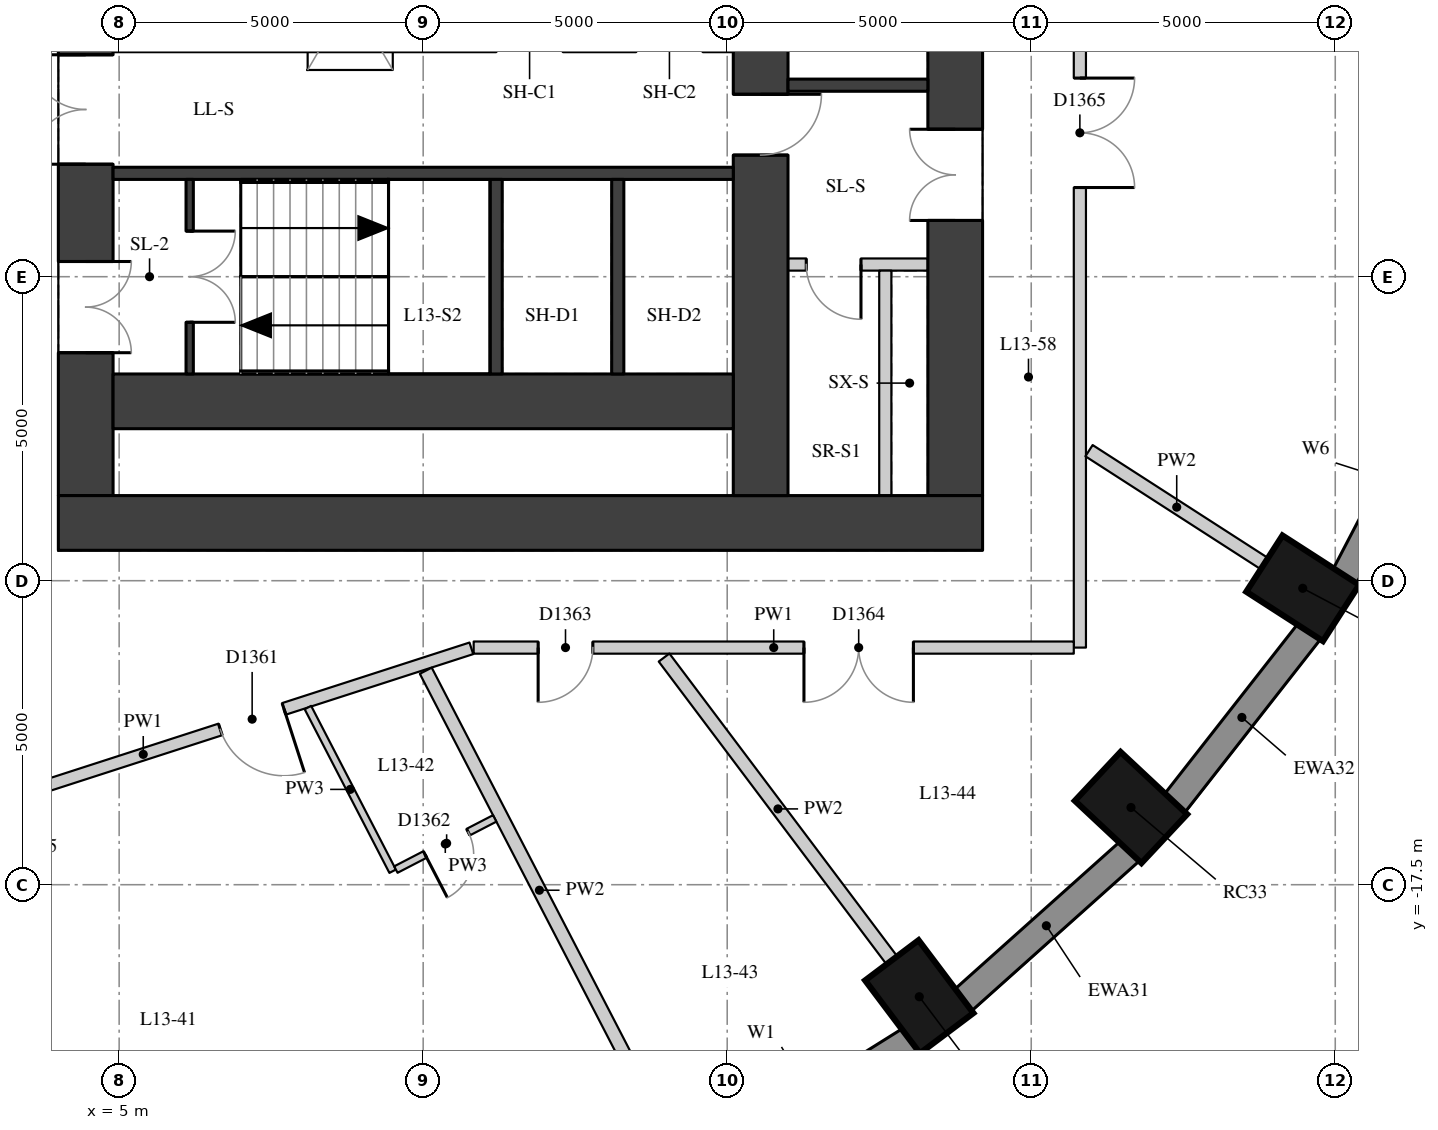
"""IFC4 building model, lengths in metres.
Left out: names, types, materials, properties, quantities, classifications, styles, units other than length and angle.
Written with IfcOpenShell. Run it as: python <this file> out.ifc"""

import sys

from ifc_helpers import new_model, si_unit, direction, frame, frame_2d, origin, origin_2d, place, context, subcontext, project, spatial, rectangle, extrude, element, fill, save


model = new_model("IFC4")
c1 = context("Model", 3, precision=1e-05, world=origin(), true_north=direction((0.0, 1.0)))
c2 = subcontext(c1, "Body", "Model", "MODEL_VIEW")
j1 = project(units=[si_unit("LENGTHUNIT", "METRE"), si_unit("PLANEANGLEUNIT", "RADIAN")], contexts=[c1])
p1 = place(None, origin())
s1 = spatial("IfcSite", under=j1, at=p1, CompositionType="ELEMENT")
p2 = place(p1, origin())
s2 = spatial("IfcBuilding", under=s1, at=p2, CompositionType="ELEMENT")
p3 = place(p2, frame((0.0, 0.0, 51.4)))
s3 = spatial("IfcBuildingStorey", under=s2, at=p3, CompositionType="ELEMENT", Elevation=51.4)
for number, where, z_axis, x_axis in (
    (1, (18.159, -19.343, 0.0), (0.0, 0.0, 1.0), (0.601, -0.799, 0.0)),
    (2, (21.641, -16.23, 0.0), (0.0, 0.0, 1.0), (0.73, -0.683, 0.0)),
    (3, (24.465, -12.625, 0.0), (0.0, 0.0, 1.0), (0.841, -0.541, 0.0)),
):
    element("IfcColumn", number, at=place(p3, frame(where, z_axis=z_axis, x_axis=x_axis)), inside=s3, PredefinedType="COLUMN", context=c2, shape_type="SweptSolid", body=[
        extrude(rectangle(XDim=1.5, YDim=1.1, at=origin_2d()), origin(), (0.0, 0.0, 1.0), 3.3),
    ])
p4 = place(p3, frame((14.817, -22.051, 0.0), z_axis=(0.0, 0.0, 1.0), x_axis=(0.847635480093, 0.530579016629, 0.0)))
e4 = element("IfcWall", 4, at=p4, inside=s3, PredefinedType="SOLIDWALL", context=c2, shape_type="SweptSolid", body=[
    extrude(rectangle(XDim=3.782, YDim=0.45, at=frame_2d((1.891, 0.0))), origin(), (0.0, 0.0, 1.0), 3.02),
])
p5 = place(p4, frame((0.791, 0.0, 0.4)))
e5 = element("IfcOpeningElement", 5, at=p5, cuts=e4, PredefinedType="OPENING", context=c2, shape_type="SweptSolid", body=[
    extrude(rectangle(XDim=2.2, YDim=1.75, at=frame_2d((1.1, 0.875))), frame((0.0, 0.235, 0.0), z_axis=(0.0, -1.0, 0.0), x_axis=(1.0, 0.0, 0.0)), (0.0, 0.0, 1.0), 0.47),
])
p6 = place(p3, frame((18.871, -19.407, 0.0), z_axis=(0.0, 0.0, 1.0), x_axis=(0.745526233716, 0.66647628228, 0.0)))
e6 = element("IfcWall", 6, at=p6, inside=s3, PredefinedType="SOLIDWALL", context=c2, shape_type="SweptSolid", body=[
    extrude(rectangle(XDim=3.697, YDim=0.45, at=frame_2d((1.848, 0.0))), origin(), (0.0, 0.0, 1.0), 3.02),
])
p7 = place(p3, frame((22.352, -16.17, 0.0), z_axis=(0.0, 0.0, 1.0), x_axis=(0.616661975264, 0.787228053529, 0.0)))
e7 = element("IfcWall", 7, at=p7, inside=s3, PredefinedType="SOLIDWALL", context=c2, shape_type="SweptSolid", body=[
    extrude(rectangle(XDim=3.61, YDim=0.45, at=frame_2d((1.805, 0.0))), origin(), (0.0, 0.0, 1.0), 3.02),
])
p8 = place(p3, frame((25.152, -12.437, 0.0), z_axis=(0.0, 0.0, 1.0), x_axis=(0.462492775226, 0.886623050041, 0.0)))
e8 = element("IfcWall", 8, at=p8, inside=s3, PredefinedType="SOLIDWALL", context=c2, shape_type="SweptSolid", body=[
    extrude(rectangle(XDim=3.532, YDim=0.45, at=frame_2d((1.766, 0.0))), origin(), (0.0, 0.0, 1.0), 3.02),
])
p9 = place(p8, frame((1.466, 0.0, 0.4)))
e9 = element("IfcOpeningElement", 9, at=p9, cuts=e8, PredefinedType="OPENING", context=c2, shape_type="SweptSolid", body=[
    extrude(rectangle(XDim=0.6, YDim=1.75, at=frame_2d((0.3, 0.875))), frame((0.0, 0.235, 0.0), z_axis=(0.0, -1.0, 0.0), x_axis=(1.0, 0.0, 0.0)), (0.0, 0.0, 1.0), 0.47),
])
p10 = place(p3, frame((4.45, -11.1, 0.0), z_axis=(0.0, 0.0, 1.0), x_axis=(0.0, 1.0, 0.0)))
e10 = element("IfcWall", 10, at=p10, inside=s3, PredefinedType="SHEAR", context=c2, shape_type="SweptSolid", body=[
    extrude(rectangle(XDim=22.2, YDim=0.9, at=frame_2d((11.1, 0.0))), origin(), (0.0, 0.0, 1.0), 3.02),
])
p11 = place(p10, frame((2.35, 0.0, 0.0)))
e11 = element("IfcOpeningElement", 11, at=p11, cuts=e10, PredefinedType="OPENING", context=c2, shape_type="SweptSolid", body=[
    extrude(rectangle(XDim=1.5, YDim=2.1, at=frame_2d((0.75, 1.05))), frame((0.0, 0.46, 0.0), z_axis=(0.0, -1.0, 0.0), x_axis=(1.0, 0.0, 0.0)), (0.0, 0.0, 1.0), 0.92),
])
p12 = place(p10, frame((5.45, 0.0, 0.0)))
e12 = element("IfcOpeningElement", 12, at=p12, cuts=e10, PredefinedType="OPENING", context=c2, shape_type="SweptSolid", body=[
    extrude(rectangle(XDim=1.8, YDim=2.1, at=frame_2d((0.9, 1.05))), frame((0.0, 0.46, 0.0), z_axis=(0.0, -1.0, 0.0), x_axis=(1.0, 0.0, 0.0)), (0.0, 0.0, 1.0), 0.92),
])
p13 = place(p10, frame((7.95, 0.0, 0.0)))
e13 = element("IfcOpeningElement", 13, at=p13, cuts=e10, PredefinedType="OPENING", context=c2, shape_type="SweptSolid", body=[
    extrude(rectangle(XDim=1.1, YDim=2.1, at=frame_2d((0.55, 1.05))), frame((0.0, 0.46, 0.0), z_axis=(0.0, -1.0, 0.0), x_axis=(1.0, 0.0, 0.0)), (0.0, 0.0, 1.0), 0.92),
])
p14 = place(p10, frame((10.6, 0.0, 0.0)))
e14 = element("IfcOpeningElement", 14, at=p14, cuts=e10, PredefinedType="OPENING", context=c2, shape_type="SweptSolid", body=[
    extrude(rectangle(XDim=1.0, YDim=2.1, at=frame_2d((0.5, 1.05))), frame((0.0, 0.46, 0.0), z_axis=(0.0, -1.0, 0.0), x_axis=(1.0, 0.0, 0.0)), (0.0, 0.0, 1.0), 0.92),
])
p15 = place(p10, frame((13.15, 0.0, 0.0)))
e15 = element("IfcOpeningElement", 15, at=p15, cuts=e10, PredefinedType="OPENING", context=c2, shape_type="SweptSolid", body=[
    extrude(rectangle(XDim=1.1, YDim=2.1, at=frame_2d((0.55, 1.05))), frame((0.0, 0.46, 0.0), z_axis=(0.0, -1.0, 0.0), x_axis=(1.0, 0.0, 0.0)), (0.0, 0.0, 1.0), 0.92),
])
p16 = place(p10, frame((14.95, 0.0, 0.0)))
e16 = element("IfcOpeningElement", 16, at=p16, cuts=e10, PredefinedType="OPENING", context=c2, shape_type="SweptSolid", body=[
    extrude(rectangle(XDim=1.8, YDim=2.1, at=frame_2d((0.9, 1.05))), frame((0.0, 0.46, 0.0), z_axis=(0.0, -1.0, 0.0), x_axis=(1.0, 0.0, 0.0)), (0.0, 0.0, 1.0), 0.92),
])
p17 = place(p10, frame((18.35, 0.0, 0.0)))
e17 = element("IfcOpeningElement", 17, at=p17, cuts=e10, PredefinedType="OPENING", context=c2, shape_type="SweptSolid", body=[
    extrude(rectangle(XDim=1.5, YDim=2.1, at=frame_2d((0.75, 1.05))), frame((0.0, 0.46, 0.0), z_axis=(0.0, -1.0, 0.0), x_axis=(1.0, 0.0, 0.0)), (0.0, 0.0, 1.0), 0.92),
])
p18 = place(p3, frame((18.75, -11.1, 0.0), z_axis=(0.0, 0.0, 1.0), x_axis=(0.0, 1.0, 0.0)))
e18 = element("IfcWall", 18, at=p18, inside=s3, PredefinedType="SHEAR", context=c2, shape_type="SweptSolid", body=[
    extrude(rectangle(XDim=22.2, YDim=0.9, at=frame_2d((11.1, 0.0))), origin(), (0.0, 0.0, 1.0), 3.02),
])
p19 = place(p18, frame((15.925, 0.0, 0.0)))
e19 = element("IfcOpeningElement", 19, at=p19, cuts=e18, PredefinedType="OPENING", context=c2, shape_type="SweptSolid", body=[
    extrude(rectangle(XDim=1.5, YDim=2.1, at=frame_2d((0.75, 1.05))), frame((0.0, 0.46, 0.0), z_axis=(0.0, -1.0, 0.0), x_axis=(1.0, 0.0, 0.0)), (0.0, 0.0, 1.0), 0.92),
])
p20 = place(p18, frame((4.525, 0.0, 0.0)))
e20 = element("IfcOpeningElement", 20, at=p20, cuts=e18, PredefinedType="OPENING", context=c2, shape_type="SweptSolid", body=[
    extrude(rectangle(XDim=1.5, YDim=2.1, at=frame_2d((0.75, 1.05))), frame((0.0, 0.46, 0.0), z_axis=(0.0, -1.0, 0.0), x_axis=(1.0, 0.0, 0.0)), (0.0, 0.0, 1.0), 0.92),
])
p21 = place(p3, frame((4.0, -11.55, 0.0), z_axis=(0.0, 0.0, 1.0), x_axis=(1.0, 0.0, 0.0)))
e21 = element("IfcWall", 21, at=p21, inside=s3, PredefinedType="SHEAR", context=c2, shape_type="SweptSolid", body=[
    extrude(rectangle(XDim=15.2, YDim=0.9, at=frame_2d((7.6, 0.0))), origin(), (0.0, 0.0, 1.0), 3.02),
])
p22 = place(p3, frame((15.55, -11.1, 0.0), z_axis=(0.0, 0.0, 1.0), x_axis=(0.0, 1.0, 0.0)))
e22 = element("IfcWall", 22, at=p22, inside=s3, PredefinedType="SHEAR", context=c2, shape_type="SweptSolid", body=[
    extrude(rectangle(XDim=22.2, YDim=0.9, at=frame_2d((11.1, 0.0))), origin(), (0.0, 0.0, 1.0), 3.02),
])
p23 = place(p22, frame((15.6, 0.0, 0.0)))
e23 = element("IfcOpeningElement", 23, at=p23, cuts=e22, PredefinedType="OPENING", context=c2, shape_type="SweptSolid", body=[
    extrude(rectangle(XDim=1.0, YDim=2.1, at=frame_2d((0.5, 1.05))), frame((0.0, 0.46, 0.0), z_axis=(0.0, -1.0, 0.0), x_axis=(1.0, 0.0, 0.0)), (0.0, 0.0, 1.0), 0.92),
])
p24 = place(p22, frame((5.6, 0.0, 0.0)))
e24 = element("IfcOpeningElement", 24, at=p24, cuts=e22, PredefinedType="OPENING", context=c2, shape_type="SweptSolid", body=[
    extrude(rectangle(XDim=1.0, YDim=2.1, at=frame_2d((0.5, 1.05))), frame((0.0, 0.46, 0.0), z_axis=(0.0, -1.0, 0.0), x_axis=(1.0, 0.0, 0.0)), (0.0, 0.0, 1.0), 0.92),
])
p25 = place(p3, frame((4.9, -9.55, 0.0), z_axis=(0.0, 0.0, 1.0), x_axis=(1.0, 0.0, 0.0)))
e25 = element("IfcWall", 25, at=p25, inside=s3, PredefinedType="SHEAR", context=c2, shape_type="SweptSolid", body=[
    extrude(rectangle(XDim=10.2, YDim=0.9, at=frame_2d((5.1, 0.0))), origin(), (0.0, 0.0, 1.0), 3.02),
])
p26 = place(p3, frame((4.9, -5.8, 0.0), z_axis=(0.0, 0.0, 1.0), x_axis=(1.0, 0.0, 0.0)))
e26 = element("IfcWall", 26, at=p26, inside=s3, PredefinedType="SHEAR", context=c2, shape_type="SweptSolid", body=[
    extrude(rectangle(XDim=10.2, YDim=0.2, at=frame_2d((5.1, 0.0))), origin(), (0.0, 0.0, 1.0), 3.02),
])
for number, where, z_axis, x_axis in (
    (27, (11.2, -9.1, 0.0), (0.0, 0.0, 1.0), (0.0, 1.0, 0.0)),
    (28, (13.2, -9.1, 0.0), (0.0, 0.0, 1.0), (0.0, 1.0, 0.0)),
):
    element("IfcWall", number, at=place(p3, frame(where, z_axis=z_axis, x_axis=x_axis)), inside=s3, PredefinedType="SHEAR", context=c2, shape_type="SweptSolid", body=[
        extrude(rectangle(XDim=3.2, YDim=0.2, at=frame_2d((1.6, 0.0))), origin(), (0.0, 0.0, 1.0), 3.02),
    ])
p27 = place(p3, frame((6.16, -9.1, 0.0), z_axis=(0.0, 0.0, 1.0), x_axis=(0.0, 1.0, 0.0)))
e29 = element("IfcWall", 29, at=p27, inside=s3, PredefinedType="SHEAR", context=c2, shape_type="SweptSolid", body=[
    extrude(rectangle(XDim=3.2, YDim=0.12, at=frame_2d((1.6, 0.0))), origin(), (0.0, 0.0, 1.0), 3.02),
])
p28 = place(p27, frame((0.85, 0.0, 0.0)))
e30 = element("IfcOpeningElement", 30, at=p28, cuts=e29, PredefinedType="OPENING", context=c2, shape_type="SweptSolid", body=[
    extrude(rectangle(XDim=1.5, YDim=2.1, at=frame_2d((0.75, 1.05))), frame((0.0, 0.07, 0.0), z_axis=(0.0, -1.0, 0.0), x_axis=(1.0, 0.0, 0.0)), (0.0, 0.0, 1.0), 0.14),
])
p29 = place(p3, frame((16.0, -4.35, 0.0), z_axis=(0.0, 0.0, 1.0), x_axis=(1.0, 0.0, 0.0)))
e31 = element("IfcWall", 31, at=p29, inside=s3, PredefinedType="SHEAR", context=c2, shape_type="SweptSolid", body=[
    extrude(rectangle(XDim=2.3, YDim=0.2, at=frame_2d((1.15, 0.0))), origin(), (0.0, 0.0, 1.0), 3.02),
])
p30 = place(p3, frame((16.0, -7.3, 0.0), z_axis=(0.0, 0.0, 1.0), x_axis=(1.0, 0.0, 0.0)))
e32 = element("IfcWall", 32, at=p30, inside=s3, PredefinedType="PARTITIONING", context=c2, shape_type="SweptSolid", body=[
    extrude(rectangle(XDim=2.3, YDim=0.2, at=frame_2d((1.15, 0.0))), origin(), (0.0, 0.0, 1.0), 3.02),
])
p31 = place(p30, frame((0.3, 0.0, 0.0)))
e33 = element("IfcOpeningElement", 33, at=p31, cuts=e32, PredefinedType="OPENING", context=c2, shape_type="SweptSolid", body=[
    extrude(rectangle(XDim=0.9, YDim=2.1, at=frame_2d((0.45, 1.05))), frame((0.0, 0.11, 0.0), z_axis=(0.0, -1.0, 0.0), x_axis=(1.0, 0.0, 0.0)), (0.0, 0.0, 1.0), 0.22),
])
p32 = place(p3, frame((17.6, -11.1, 0.0), z_axis=(0.0, 0.0, 1.0), x_axis=(0.0, 1.0, 0.0)))
e34 = element("IfcWall", 34, at=p32, inside=s3, PredefinedType="PARTITIONING", context=c2, shape_type="SweptSolid", body=[
    extrude(rectangle(XDim=3.7, YDim=0.2, at=frame_2d((1.85, 0.0))), origin(), (0.0, 0.0, 1.0), 3.02),
])
p33 = place(p3, frame((20.8, 13.5, 0.0), z_axis=(0.0, 0.0, 1.0), x_axis=(0.0, -1.0, 0.0)))
e35 = element("IfcWall", 35, at=p33, inside=s3, PredefinedType="PARTITIONING", context=c2, shape_type="SweptSolid", body=[
    extrude(rectangle(XDim=27.1, YDim=0.2, at=frame_2d((13.55, 0.0))), origin(), (0.0, 0.0, 1.0), 3.02),
])
p34 = place(p33, frame((17.733, 0.0, 0.0)))
e36 = element("IfcOpeningElement", 36, at=p34, cuts=e35, PredefinedType="OPENING", context=c2, shape_type="SweptSolid", body=[
    extrude(rectangle(XDim=1.8, YDim=2.1, at=frame_2d((0.9, 1.05))), frame((0.0, 0.11, 0.0), z_axis=(0.0, -1.0, 0.0), x_axis=(1.0, 0.0, 0.0)), (0.0, 0.0, 1.0), 0.22),
])
p35 = place(p33, frame((9.448, 0.0, 0.0)))
e37 = element("IfcOpeningElement", 37, at=p35, cuts=e35, PredefinedType="OPENING", context=c2, shape_type="SweptSolid", body=[
    extrude(rectangle(XDim=1.8, YDim=2.1, at=frame_2d((0.9, 1.05))), frame((0.0, 0.11, 0.0), z_axis=(0.0, -1.0, 0.0), x_axis=(1.0, 0.0, 0.0)), (0.0, 0.0, 1.0), 0.22),
])
p36 = place(p33, frame((2.704, 0.0, 0.0)))
e38 = element("IfcOpeningElement", 38, at=p36, cuts=e35, PredefinedType="OPENING", context=c2, shape_type="SweptSolid", body=[
    extrude(rectangle(XDim=1.8, YDim=2.1, at=frame_2d((0.9, 1.05))), frame((0.0, 0.11, 0.0), z_axis=(0.0, -1.0, 0.0), x_axis=(1.0, 0.0, 0.0)), (0.0, 0.0, 1.0), 0.22),
])
p37 = place(p3, frame((20.7, -13.6, 0.0), z_axis=(0.0, 0.0, 1.0), x_axis=(-1.0, 0.0, 0.0)))
e39 = element("IfcWall", 39, at=p37, inside=s3, PredefinedType="PARTITIONING", context=c2, shape_type="SweptSolid", body=[
    extrude(rectangle(XDim=9.87, YDim=0.2, at=frame_2d((4.935, 0.0))), origin(), (0.0, 0.0, 1.0), 3.02),
])
p38 = place(p37, frame((7.909, 0.0, 0.0)))
e40 = element("IfcOpeningElement", 40, at=p38, cuts=e39, PredefinedType="OPENING", context=c2, shape_type="SweptSolid", body=[
    extrude(rectangle(XDim=0.9, YDim=2.1, at=frame_2d((0.45, 1.05))), frame((0.0, 0.11, 0.0), z_axis=(0.0, -1.0, 0.0), x_axis=(1.0, 0.0, 0.0)), (0.0, 0.0, 1.0), 0.22),
])
p39 = place(p37, frame((2.638, 0.0, 0.0)))
e41 = element("IfcOpeningElement", 41, at=p39, cuts=e39, PredefinedType="OPENING", context=c2, shape_type="SweptSolid", body=[
    extrude(rectangle(XDim=1.8, YDim=2.1, at=frame_2d((0.9, 1.05))), frame((0.0, 0.11, 0.0), z_axis=(0.0, -1.0, 0.0), x_axis=(1.0, 0.0, 0.0)), (0.0, 0.0, 1.0), 0.22),
])
p40 = place(p3, frame((10.792, -13.612, 0.0), z_axis=(0.0, 0.0, 1.0), x_axis=(-0.951542928403, -0.307515943336, 0.0)))
e42 = element("IfcWall", 42, at=p40, inside=s3, PredefinedType="PARTITIONING", context=c2, shape_type="SweptSolid", body=[
    extrude(rectangle(XDim=11.342, YDim=0.2, at=frame_2d((5.671, 0.0))), origin(), (0.0, 0.0, 1.0), 3.02),
])
p41 = place(p40, frame((3.239, 0.0, 0.0)))
e43 = element("IfcOpeningElement", 43, at=p41, cuts=e42, PredefinedType="OPENING", context=c2, shape_type="SweptSolid", body=[
    extrude(rectangle(XDim=1.1, YDim=2.1, at=frame_2d((0.55, 1.05))), frame((0.0, 0.11, 0.0), z_axis=(0.0, -1.0, 0.0), x_axis=(1.0, 0.0, 0.0)), (0.0, 0.0, 1.0), 0.22),
])
p42 = place(p3, frame((13.78, -21.201, 0.0), z_axis=(0.0, 0.0, 1.0), x_axis=(-0.459685115008, 0.888081975405, 0.0)))
e44 = element("IfcWall", 44, at=p42, inside=s3, PredefinedType="PARTITIONING", context=c2, shape_type="SweptSolid", body=[
    extrude(rectangle(XDim=8.131, YDim=0.22, at=frame_2d((4.065, 0.0))), origin(), (0.0, 0.0, 1.0), 3.02),
])
p43 = place(p3, frame((17.708, -18.743, 0.0), z_axis=(0.0, 0.0, 1.0), x_axis=(-0.601177883261, 0.799115231164, 0.0)))
e45 = element("IfcWall", 45, at=p43, inside=s3, PredefinedType="PARTITIONING", context=c2, shape_type="SweptSolid", body=[
    extrude(rectangle(XDim=6.231, YDim=0.22, at=frame_2d((3.116, 0.0))), origin(), (0.0, 0.0, 1.0), 3.02),
])
p44 = place(p3, frame((23.835, -12.219, 0.0), z_axis=(0.0, 0.0, 1.0), x_axis=(-0.840694872373, 0.541509124176, 0.0)))
e46 = element("IfcWall", 46, at=p44, inside=s3, PredefinedType="PARTITIONING", context=c2, shape_type="SweptSolid", body=[
    extrude(rectangle(XDim=3.43, YDim=0.22, at=frame_2d((1.715, 0.0))), origin(), (0.0, 0.0, 1.0), 3.02),
])
p45 = place(p3, frame((8.104, -14.586, 0.0), z_axis=(0.0, 0.0, 1.0), x_axis=(0.459668270166, -0.888090694357, 0.0)))
e47 = element("IfcWall", 47, at=p45, inside=s3, PredefinedType="PARTITIONING", context=c2, shape_type="SweptSolid", body=[
    extrude(rectangle(XDim=3.032, YDim=0.12, at=frame_2d((1.516, 0.0))), origin(), (0.0, 0.0, 1.0), 3.02),
])
p46 = place(p3, frame((9.551, -17.251, 0.0), z_axis=(0.0, 0.0, 1.0), x_axis=(0.88806930088, 0.459709600546, 0.0)))
e48 = element("IfcWall", 48, at=p46, inside=s3, PredefinedType="PARTITIONING", context=c2, shape_type="SweptSolid", body=[
    extrude(rectangle(XDim=1.83, YDim=0.12, at=frame_2d((0.915, 0.0))), origin(), (0.0, 0.0, 1.0), 3.02),
])
p47 = place(p46, frame((0.54, 0.0, 0.0)))
e49 = element("IfcOpeningElement", 49, at=p47, cuts=e48, PredefinedType="OPENING", context=c2, shape_type="SweptSolid", body=[
    extrude(rectangle(XDim=0.8, YDim=2.1, at=frame_2d((0.4, 1.05))), frame((0.0, 0.07, 0.0), z_axis=(0.0, -1.0, 0.0), x_axis=(1.0, 0.0, 0.0)), (0.0, 0.0, 1.0), 0.14),
])
p48 = place(p11, origin())
e50 = element("IfcDoor", 50, at=p48, inside=s3, OperationType="DOUBLE_DOOR_SINGLE_SWING", PredefinedType="DOOR", context=c2, shape_type="SweptSolid", body=[
    extrude(rectangle(XDim=1.5, YDim=2.1, at=frame_2d((0.75, 1.05))), frame((0.0, 0.025, 0.0), z_axis=(0.0, -1.0, 0.0), x_axis=(1.0, 0.0, 0.0)), (0.0, 0.0, 1.0), 0.05),
])
fill(e11, e50)
p49 = place(p12, origin())
e51 = element("IfcDoor", 51, at=p49, inside=s3, OperationType="DOUBLE_DOOR_SINGLE_SWING", PredefinedType="DOOR", context=c2, shape_type="SweptSolid", body=[
    extrude(rectangle(XDim=1.8, YDim=2.1, at=frame_2d((0.9, 1.05))), frame((0.0, 0.025, 0.0), z_axis=(0.0, -1.0, 0.0), x_axis=(1.0, 0.0, 0.0)), (0.0, 0.0, 1.0), 0.05),
])
fill(e12, e51)
p50 = place(p20, origin())
e52 = element("IfcDoor", 52, at=p50, inside=s3, OperationType="DOUBLE_DOOR_SINGLE_SWING", PredefinedType="DOOR", context=c2, shape_type="SweptSolid", body=[
    extrude(rectangle(XDim=1.5, YDim=2.1, at=frame_2d((0.75, 1.05))), frame((0.0, 0.025, 0.0), z_axis=(0.0, -1.0, 0.0), x_axis=(1.0, 0.0, 0.0)), (0.0, 0.0, 1.0), 0.05),
])
fill(e20, e52)
p51 = place(p28, origin())
e53 = element("IfcDoor", 53, at=p51, inside=s3, OperationType="DOUBLE_DOOR_SINGLE_SWING", PredefinedType="DOOR", context=c2, shape_type="SweptSolid", body=[
    extrude(rectangle(XDim=1.5, YDim=2.1, at=frame_2d((0.75, 1.05))), frame((0.0, 0.025, 0.0), z_axis=(0.0, -1.0, 0.0), x_axis=(1.0, 0.0, 0.0)), (0.0, 0.0, 1.0), 0.05),
])
fill(e30, e53)
p52 = place(p24, origin())
e54 = element("IfcDoor", 54, at=p52, inside=s3, OperationType="SINGLE_SWING_LEFT", PredefinedType="DOOR", context=c2, shape_type="SweptSolid", body=[
    extrude(rectangle(XDim=1.0, YDim=2.1, at=frame_2d((0.5, 1.05))), frame((0.0, 0.025, 0.0), z_axis=(0.0, -1.0, 0.0), x_axis=(1.0, 0.0, 0.0)), (0.0, 0.0, 1.0), 0.05),
])
fill(e24, e54)
p53 = place(p31, origin())
e55 = element("IfcDoor", 55, at=p53, inside=s3, OperationType="SINGLE_SWING_LEFT", PredefinedType="DOOR", context=c2, shape_type="SweptSolid", body=[
    extrude(rectangle(XDim=0.9, YDim=2.1, at=frame_2d((0.45, 1.05))), frame((0.0, 0.025, 0.0), z_axis=(0.0, -1.0, 0.0), x_axis=(1.0, 0.0, 0.0)), (0.0, 0.0, 1.0), 0.05),
])
fill(e33, e55)
p54 = place(p41, origin())
e56 = element("IfcDoor", 56, at=p54, inside=s3, OperationType="SINGLE_SWING_LEFT", PredefinedType="DOOR", context=c2, shape_type="SweptSolid", body=[
    extrude(rectangle(XDim=1.1, YDim=2.1, at=frame_2d((0.55, 1.05))), frame((0.0, 0.025, 0.0), z_axis=(0.0, -1.0, 0.0), x_axis=(1.0, 0.0, 0.0)), (0.0, 0.0, 1.0), 0.05),
])
fill(e43, e56)
p55 = place(p47, origin())
e57 = element("IfcDoor", 57, at=p55, inside=s3, OperationType="SINGLE_SWING_RIGHT", PredefinedType="DOOR", context=c2, shape_type="SweptSolid", body=[
    extrude(rectangle(XDim=0.8, YDim=2.1, at=frame_2d((0.4, 1.05))), frame((0.0, 0.025, 0.0), z_axis=(0.0, -1.0, 0.0), x_axis=(1.0, 0.0, 0.0)), (0.0, 0.0, 1.0), 0.05),
])
fill(e49, e57)
p56 = place(p38, origin())
e58 = element("IfcDoor", 58, at=p56, inside=s3, OperationType="SINGLE_SWING_RIGHT", PredefinedType="DOOR", context=c2, shape_type="SweptSolid", body=[
    extrude(rectangle(XDim=0.9, YDim=2.1, at=frame_2d((0.45, 1.05))), frame((0.0, 0.025, 0.0), z_axis=(0.0, -1.0, 0.0), x_axis=(1.0, 0.0, 0.0)), (0.0, 0.0, 1.0), 0.05),
])
fill(e40, e58)
p57 = place(p39, origin())
e59 = element("IfcDoor", 59, at=p57, inside=s3, OperationType="DOUBLE_DOOR_SINGLE_SWING", PredefinedType="DOOR", context=c2, shape_type="SweptSolid", body=[
    extrude(rectangle(XDim=1.8, YDim=2.1, at=frame_2d((0.9, 1.05))), frame((0.0, 0.025, 0.0), z_axis=(0.0, -1.0, 0.0), x_axis=(1.0, 0.0, 0.0)), (0.0, 0.0, 1.0), 0.05),
])
fill(e41, e59)
p58 = place(p34, origin())
e60 = element("IfcDoor", 60, at=p58, inside=s3, OperationType="DOUBLE_DOOR_SINGLE_SWING", PredefinedType="DOOR", context=c2, shape_type="SweptSolid", body=[
    extrude(rectangle(XDim=1.8, YDim=2.1, at=frame_2d((0.9, 1.05))), frame((0.0, 0.025, 0.0), z_axis=(0.0, -1.0, 0.0), x_axis=(1.0, 0.0, 0.0)), (0.0, 0.0, 1.0), 0.05),
])
fill(e36, e60)
save(model, sys.argv[1])
